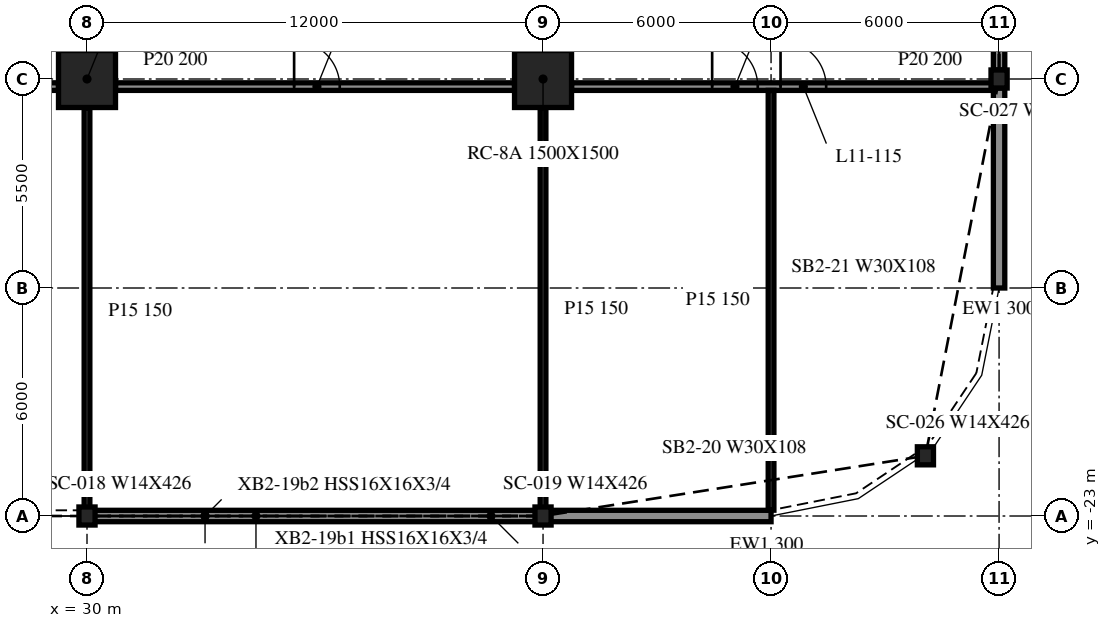
"""IFC4 building model, lengths in metres.
Left out: names, types, materials, properties, quantities, classifications, styles, units other than length and angle.
Written with IfcOpenShell. Run it as: python <this file> out.ifc"""

import sys

from ifc_helpers import new_model, si_unit, direction, frame, frame_2d, origin, origin_2d, place, context, subcontext, project, spatial, rectangle, i_section, extrude, element, fill, save


model = new_model("IFC4")
c1 = context("Model", 3, precision=1e-05, world=origin(), true_north=direction((0.0, 1.0)))
c2 = subcontext(c1, "Body", "Model", "MODEL_VIEW")
j1 = project(units=[si_unit("LENGTHUNIT", "METRE"), si_unit("PLANEANGLEUNIT", "RADIAN")], contexts=[c1])
p1 = place(None, origin())
s1 = spatial("IfcSite", under=j1, at=p1, CompositionType="ELEMENT")
p2 = place(p1, origin())
s2 = spatial("IfcBuilding", under=s1, at=p2, CompositionType="ELEMENT")
p3 = place(p2, frame((0.0, 0.0, 50.3)))
s3 = spatial("IfcBuildingStorey", under=s2, at=p3, CompositionType="ELEMENT", Elevation=50.3)
for number, where, z_axis, x_axis in (
    (1, (30.0, -11.5, -0.34), (0.0, 0.0, 1.0), (1.0, 0.0, 0.0)),
    (2, (42.0, -11.5, -0.34), (0.0, 0.0, 1.0), (1.0, 0.0, 0.0)),
):
    element("IfcColumn", number, at=place(p3, frame(where, z_axis=z_axis, x_axis=x_axis)), inside=s3, PredefinedType="COLUMN", context=c2, shape_type="SweptSolid", body=[
        extrude(rectangle(XDim=1.5, YDim=1.5, at=origin_2d()), origin(), (0.0, 0.0, 1.0), 4.3),
    ])
for number, where, z_axis, x_axis in (
    (3, (30.0, -23.0, -0.34), (0.0, 0.0, 1.0), (1.0, 0.0, 0.0)),
    (4, (42.0, -23.0, -0.34), (0.0, 0.0, 1.0), (1.0, 0.0, 0.0)),
    (5, (52.062, -21.416, -0.34), (0.0, 0.0, 1.0), (1.0, 0.0, 0.0)),
    (6, (54.0, -11.5, -0.34), (0.0, 0.0, 1.0), (1.0, 0.0, 0.0)),
):
    element("IfcColumn", number, at=place(p3, frame(where, z_axis=z_axis, x_axis=x_axis)), inside=s3, PredefinedType="COLUMN", context=c2, shape_type="SweptSolid", body=[
        extrude(i_section(OverallWidth=0.424, OverallDepth=0.475, WebThickness=0.048, FlangeThickness=0.077, at=origin_2d()), origin(), (0.0, 0.0, 1.0), 4.3),
    ])
p4 = place(p3, frame((30.024, -23.0, 0.0), z_axis=(0.0, 0.0, 1.0), x_axis=(1.0, 0.0, 0.0)))
e7 = element("IfcWall", 7, at=p4, inside=s3, PredefinedType="NOTDEFINED", context=c2, shape_type="SweptSolid", body=[
    extrude(rectangle(XDim=11.952, YDim=0.3, at=frame_2d((5.976, 0.0))), origin(), (0.0, 0.0, 1.0), 3.203),
])
p5 = place(p3, frame((42.024, -23.0, 0.0), z_axis=(0.0, 0.0, 1.0), x_axis=(1.0, 0.0, 0.0)))
e8 = element("IfcWall", 8, at=p5, inside=s3, PredefinedType="NOTDEFINED", context=c2, shape_type="SweptSolid", body=[
    extrude(rectangle(XDim=5.976, YDim=0.3, at=frame_2d((2.988, 0.0))), origin(), (0.0, 0.0, 1.0), 3.203),
])
p6 = place(p3, frame((54.0, -17.0, 0.0), z_axis=(0.0, 0.0, 1.0), x_axis=(0.0, 1.0, 0.0)))
e9 = element("IfcWall", 9, at=p6, inside=s3, PredefinedType="NOTDEFINED", context=c2, shape_type="SweptSolid", body=[
    extrude(rectangle(XDim=5.262, YDim=0.3, at=frame_2d((2.631, 0.0))), origin(), (0.0, 0.0, 1.0), 3.203),
])
p7 = place(p3, frame((54.0, -11.262, 0.0), z_axis=(0.0, 0.0, 1.0), x_axis=(0.0, 1.0, 0.0)))
e10 = element("IfcWall", 10, at=p7, inside=s3, PredefinedType="NOTDEFINED", context=c2, shape_type="SweptSolid", body=[
    extrude(rectangle(XDim=11.024, YDim=0.3, at=frame_2d((5.512, 0.0))), origin(), (0.0, 0.0, 1.0), 3.203),
])
p8 = place(p3, frame((18.75, -11.7, 0.0), z_axis=(0.0, 0.0, 1.0), x_axis=(1.0, 0.0, 0.0)))
e11 = element("IfcWall", 11, at=p8, inside=s3, PredefinedType="PARTITIONING", context=c2, shape_type="SweptSolid", body=[
    extrude(rectangle(XDim=10.5, YDim=0.2, at=frame_2d((5.25, 0.0))), origin(), (0.0, 0.0, 1.0), 3.96),
])
p9 = place(p8, frame((0.9, 0.0, 0.0)))
e12 = element("IfcOpeningElement", 12, at=p9, cuts=e11, PredefinedType="OPENING", context=c2, shape_type="SweptSolid", body=[
    extrude(rectangle(XDim=1.0, YDim=2.1, at=frame_2d((0.5, 1.05))), frame((0.0, 0.11, 0.0), z_axis=(0.0, -1.0, 0.0), x_axis=(1.0, 0.0, 0.0)), (0.0, 0.0, 1.0), 0.22),
])
p10 = place(p8, frame((3.7, 0.0, 0.0)))
e13 = element("IfcOpeningElement", 13, at=p10, cuts=e11, PredefinedType="OPENING", context=c2, shape_type="SweptSolid", body=[
    extrude(rectangle(XDim=1.2, YDim=2.1, at=frame_2d((0.6, 1.05))), frame((0.0, 0.11, 0.0), z_axis=(0.0, -1.0, 0.0), x_axis=(1.0, 0.0, 0.0)), (0.0, 0.0, 1.0), 0.22),
])
p11 = place(p8, frame((5.5, 0.0, 0.0)))
e14 = element("IfcOpeningElement", 14, at=p11, cuts=e11, PredefinedType="OPENING", context=c2, shape_type="SweptSolid", body=[
    extrude(rectangle(XDim=1.2, YDim=2.1, at=frame_2d((0.6, 1.05))), frame((0.0, 0.11, 0.0), z_axis=(0.0, -1.0, 0.0), x_axis=(1.0, 0.0, 0.0)), (0.0, 0.0, 1.0), 0.22),
])
p12 = place(p3, frame((30.75, -11.7, 0.0), z_axis=(0.0, 0.0, 1.0), x_axis=(1.0, 0.0, 0.0)))
e15 = element("IfcWall", 15, at=p12, inside=s3, PredefinedType="PARTITIONING", context=c2, shape_type="SweptSolid", body=[
    extrude(rectangle(XDim=10.5, YDim=0.2, at=frame_2d((5.25, 0.0))), origin(), (0.0, 0.0, 1.0), 3.96),
])
p13 = place(p12, frame((4.7, 0.0, 0.0)))
e16 = element("IfcOpeningElement", 16, at=p13, cuts=e15, PredefinedType="OPENING", context=c2, shape_type="SweptSolid", body=[
    extrude(rectangle(XDim=1.2, YDim=2.1, at=frame_2d((0.6, 1.05))), frame((0.0, 0.11, 0.0), z_axis=(0.0, -1.0, 0.0), x_axis=(1.0, 0.0, 0.0)), (0.0, 0.0, 1.0), 0.22),
])
p14 = place(p3, frame((42.75, -11.7, 0.0), z_axis=(0.0, 0.0, 1.0), x_axis=(1.0, 0.0, 0.0)))
e17 = element("IfcWall", 17, at=p14, inside=s3, PredefinedType="PARTITIONING", context=c2, shape_type="SweptSolid", body=[
    extrude(rectangle(XDim=11.1, YDim=0.2, at=frame_2d((5.55, 0.0))), origin(), (0.0, 0.0, 1.0), 3.96),
])
p15 = place(p14, frame((3.7, 0.0, 0.0)))
e18 = element("IfcOpeningElement", 18, at=p15, cuts=e17, PredefinedType="OPENING", context=c2, shape_type="SweptSolid", body=[
    extrude(rectangle(XDim=1.2, YDim=2.1, at=frame_2d((0.6, 1.05))), frame((0.0, 0.11, 0.0), z_axis=(0.0, -1.0, 0.0), x_axis=(1.0, 0.0, 0.0)), (0.0, 0.0, 1.0), 0.22),
])
p16 = place(p14, frame((5.5, 0.0, 0.0)))
e19 = element("IfcOpeningElement", 19, at=p16, cuts=e17, PredefinedType="OPENING", context=c2, shape_type="SweptSolid", body=[
    extrude(rectangle(XDim=1.2, YDim=2.1, at=frame_2d((0.6, 1.05))), frame((0.0, 0.11, 0.0), z_axis=(0.0, -1.0, 0.0), x_axis=(1.0, 0.0, 0.0)), (0.0, 0.0, 1.0), 0.22),
])
p17 = place(p3, frame((30.0, -22.975, 0.0), z_axis=(0.0, 0.0, 1.0), x_axis=(0.0, 1.0, 0.0)))
e20 = element("IfcWall", 20, at=p17, inside=s3, PredefinedType="PARTITIONING", context=c2, shape_type="SweptSolid", body=[
    extrude(rectangle(XDim=10.725, YDim=0.15, at=frame_2d((5.363, 0.0))), origin(), (0.0, 0.0, 1.0), 3.96),
])
p18 = place(p3, frame((42.0, -22.85, 0.0), z_axis=(0.0, 0.0, 1.0), x_axis=(0.0, 1.0, 0.0)))
e21 = element("IfcWall", 21, at=p18, inside=s3, PredefinedType="PARTITIONING", context=c2, shape_type="SweptSolid", body=[
    extrude(rectangle(XDim=10.6, YDim=0.15, at=frame_2d((5.3, 0.0))), origin(), (0.0, 0.0, 1.0), 3.96),
])
p19 = place(p3, frame((48.0, -22.847, 0.0), z_axis=(0.0, 0.0, 1.0), x_axis=(0.0, 1.0, 0.0)))
e22 = element("IfcWall", 22, at=p19, inside=s3, PredefinedType="PARTITIONING", context=c2, shape_type="SweptSolid", body=[
    extrude(rectangle(XDim=11.047, YDim=0.15, at=frame_2d((5.523, 0.0))), origin(), (0.0, 0.0, 1.0), 3.96),
])
p20 = place(p13, origin())
e23 = element("IfcDoor", 23, at=p20, inside=s3, OperationType="SINGLE_SWING_LEFT", PredefinedType="DOOR", context=c2, shape_type="SweptSolid", body=[
    extrude(rectangle(XDim=1.2, YDim=2.1, at=frame_2d((0.6, 1.05))), frame((0.0, 0.025, 0.0), z_axis=(0.0, -1.0, 0.0), x_axis=(1.0, 0.0, 0.0)), (0.0, 0.0, 1.0), 0.05),
])
fill(e16, e23)
p21 = place(p15, origin())
e24 = element("IfcDoor", 24, at=p21, inside=s3, OperationType="SINGLE_SWING_RIGHT", PredefinedType="DOOR", context=c2, shape_type="SweptSolid", body=[
    extrude(rectangle(XDim=1.2, YDim=2.1, at=frame_2d((0.6, 1.05))), frame((0.0, 0.025, 0.0), z_axis=(0.0, -1.0, 0.0), x_axis=(1.0, 0.0, 0.0)), (0.0, 0.0, 1.0), 0.05),
])
fill(e18, e24)
p22 = place(p16, origin())
e25 = element("IfcDoor", 25, at=p22, inside=s3, OperationType="SINGLE_SWING_LEFT", PredefinedType="DOOR", context=c2, shape_type="SweptSolid", body=[
    extrude(rectangle(XDim=1.2, YDim=2.1, at=frame_2d((0.6, 1.05))), frame((0.0, 0.025, 0.0), z_axis=(0.0, -1.0, 0.0), x_axis=(1.0, 0.0, 0.0)), (0.0, 0.0, 1.0), 0.05),
])
fill(e19, e25)
save(model, sys.argv[1])
